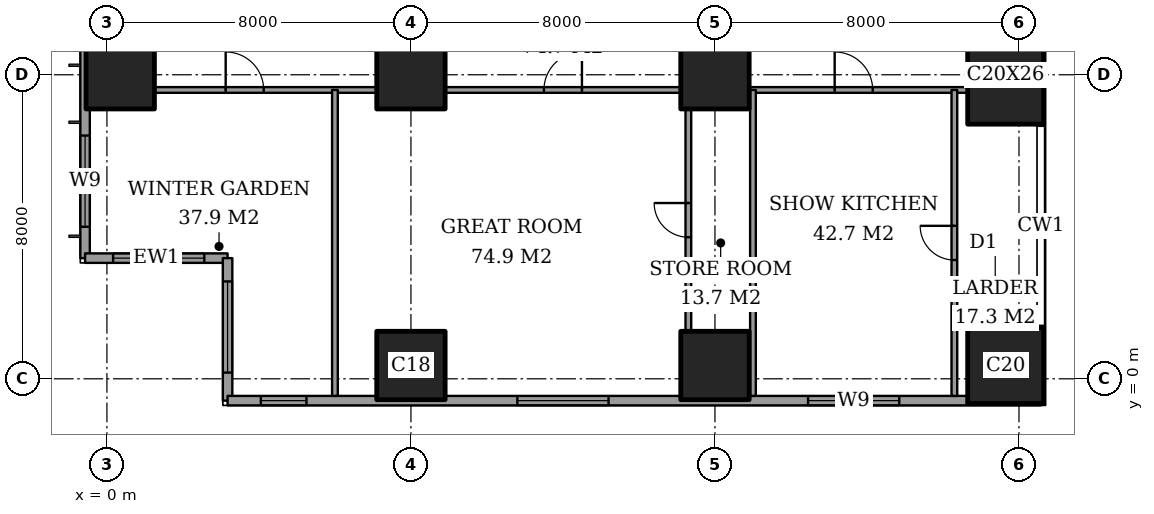
"""IFC4 building model, lengths in metres.
Left out: names, types, materials, properties, quantities, classifications, styles, units other than length and angle.
Written with IfcOpenShell. Run it as: python <this file> out.ifc"""

import sys

from ifc_helpers import new_model, si_unit, direction, frame, frame_2d, origin, origin_2d, place, context, subcontext, project, spatial, rectangle, extrude, element, fill, save


model = new_model("IFC4")
c1 = context("Model", 3, precision=1e-05, world=origin(), true_north=direction((0.0, 1.0)))
c2 = subcontext(c1, "Body", "Model", "MODEL_VIEW")
j1 = project(units=[si_unit("LENGTHUNIT", "METRE"), si_unit("PLANEANGLEUNIT", "RADIAN")], contexts=[c1])
p1 = place(None, origin())
s1 = spatial("IfcSite", under=j1, at=p1, CompositionType="ELEMENT")
p2 = place(p1, origin())
s2 = spatial("IfcBuilding", under=s1, at=p2, CompositionType="ELEMENT")
p3 = place(p2, frame((0.0, 0.0, 196.6)))
s3 = spatial("IfcBuildingStorey", under=s2, at=p3, CompositionType="ELEMENT", Elevation=196.6)
for number, where, z_axis, x_axis in (
    (1, (0.35, 8.0, 0.0), (0.0, 0.0, 1.0), (1.0, 0.0, 0.0)),
    (2, (8.0, 0.35, 0.0), (0.0, 0.0, 1.0), (1.0, 0.0, 0.0)),
    (3, (8.0, 8.0, 0.0), (0.0, 0.0, 1.0), (1.0, 0.0, 0.0)),
    (4, (16.0, 0.35, 0.0), (0.0, 0.0, 1.0), (1.0, 0.0, 0.0)),
    (5, (16.0, 8.0, 0.0), (0.0, 0.0, 1.0), (1.0, 0.0, 0.0)),
):
    element("IfcColumn", number, at=place(p3, frame(where, z_axis=z_axis, x_axis=x_axis)), inside=s3, PredefinedType="COLUMN", context=c2, shape_type="SweptSolid", body=[
        extrude(rectangle(XDim=1.8, YDim=1.8, at=origin_2d()), origin(), (0.0, 0.0, 1.0), 3.6),
    ])
p4 = place(p3, frame((23.65, 0.35, 0.0), z_axis=(0.0, 0.0, 1.0), x_axis=(1.0, 0.0, 0.0)))
e6 = element("IfcColumn", 6, at=p4, inside=s3, PredefinedType="COLUMN", context=c2, shape_type="SweptSolid", body=[
    extrude(rectangle(XDim=2.0, YDim=2.0, at=origin_2d()), origin(), (0.0, 0.0, 1.0), 3.6),
])
p5 = place(p3, frame((23.65, 8.0, 0.0), z_axis=(0.0, 0.0, 1.0), x_axis=(1.0, 0.0, 0.0)))
e7 = element("IfcColumn", 7, at=p5, inside=s3, PredefinedType="COLUMN", context=c2, shape_type="SweptSolid", body=[
    extrude(rectangle(XDim=2.0, YDim=2.6, at=origin_2d()), origin(), (0.0, 0.0, 1.0), 3.6),
])
p6 = place(p3, frame((-0.575, 44.825, 0.0), z_axis=(0.0, 0.0, 1.0), x_axis=(0.0, -1.0, 0.0)))
e8 = element("IfcWall", 8, at=p6, inside=s3, PredefinedType="SOLIDWALL", context=c2, shape_type="SweptSolid", body=[
    extrude(rectangle(XDim=41.65, YDim=0.25, at=frame_2d((20.825, 0.0))), origin(), (0.0, 0.0, 1.0), 3.6),
])
p7 = place(p6, frame((0.825, 0.0, 0.2)))
e9 = element("IfcOpeningElement", 9, at=p7, cuts=e8, PredefinedType="OPENING", context=c2, shape_type="SweptSolid", body=[
    extrude(rectangle(XDim=2.4, YDim=2.4, at=frame_2d((1.2, 1.2))), frame((0.0, 0.135, 0.0), z_axis=(0.0, -1.0, 0.0), x_axis=(1.0, 0.0, 0.0)), (0.0, 0.0, 1.0), 0.27),
])
p8 = place(p6, frame((6.05, 0.0, 0.2)))
e10 = element("IfcOpeningElement", 10, at=p8, cuts=e8, PredefinedType="OPENING", context=c2, shape_type="SweptSolid", body=[
    extrude(rectangle(XDim=1.2, YDim=2.4, at=frame_2d((0.6, 1.2))), frame((0.0, 0.135, 0.0), z_axis=(0.0, -1.0, 0.0), x_axis=(1.0, 0.0, 0.0)), (0.0, 0.0, 1.0), 0.27),
])
p9 = place(p6, frame((8.225, 0.0, 0.2)))
e11 = element("IfcOpeningElement", 11, at=p9, cuts=e8, PredefinedType="OPENING", context=c2, shape_type="SweptSolid", body=[
    extrude(rectangle(XDim=2.4, YDim=2.4, at=frame_2d((1.2, 1.2))), frame((0.0, 0.135, 0.0), z_axis=(0.0, -1.0, 0.0), x_axis=(1.0, 0.0, 0.0)), (0.0, 0.0, 1.0), 0.27),
])
p10 = place(p6, frame((15.625, 0.0, 0.2)))
e12 = element("IfcOpeningElement", 12, at=p10, cuts=e8, PredefinedType="OPENING", context=c2, shape_type="SweptSolid", body=[
    extrude(rectangle(XDim=2.4, YDim=2.4, at=frame_2d((1.2, 1.2))), frame((0.0, 0.135, 0.0), z_axis=(0.0, -1.0, 0.0), x_axis=(1.0, 0.0, 0.0)), (0.0, 0.0, 1.0), 0.27),
])
p11 = place(p6, frame((23.625, 0.0, 0.2)))
e13 = element("IfcOpeningElement", 13, at=p11, cuts=e8, PredefinedType="OPENING", context=c2, shape_type="SweptSolid", body=[
    extrude(rectangle(XDim=2.4, YDim=2.4, at=frame_2d((1.2, 1.2))), frame((0.0, 0.135, 0.0), z_axis=(0.0, -1.0, 0.0), x_axis=(1.0, 0.0, 0.0)), (0.0, 0.0, 1.0), 0.27),
])
p12 = place(p6, frame((30.775, 0.0, 0.2)))
e14 = element("IfcOpeningElement", 14, at=p12, cuts=e8, PredefinedType="OPENING", context=c2, shape_type="SweptSolid", body=[
    extrude(rectangle(XDim=2.4, YDim=2.4, at=frame_2d((1.2, 1.2))), frame((0.0, 0.135, 0.0), z_axis=(0.0, -1.0, 0.0), x_axis=(1.0, 0.0, 0.0)), (0.0, 0.0, 1.0), 0.27),
])
p13 = place(p6, frame((34.55, 0.0, 0.2)))
e15 = element("IfcOpeningElement", 15, at=p13, cuts=e8, PredefinedType="OPENING", context=c2, shape_type="SweptSolid", body=[
    extrude(rectangle(XDim=1.2, YDim=2.4, at=frame_2d((0.6, 1.2))), frame((0.0, 0.135, 0.0), z_axis=(0.0, -1.0, 0.0), x_axis=(1.0, 0.0, 0.0)), (0.0, 0.0, 1.0), 0.27),
])
p14 = place(p6, frame((38.425, 0.0, 0.2)))
e16 = element("IfcOpeningElement", 16, at=p14, cuts=e8, PredefinedType="OPENING", context=c2, shape_type="SweptSolid", body=[
    extrude(rectangle(XDim=2.4, YDim=2.4, at=frame_2d((1.2, 1.2))), frame((0.0, 0.135, 0.0), z_axis=(0.0, -1.0, 0.0), x_axis=(1.0, 0.0, 0.0)), (0.0, 0.0, 1.0), 0.27),
])
p15 = place(p3, frame((-0.575, 3.175, 0.0), z_axis=(0.0, 0.0, 1.0), x_axis=(1.0, 0.0, 0.0)))
e17 = element("IfcWall", 17, at=p15, inside=s3, PredefinedType="SOLIDWALL", context=c2, shape_type="SweptSolid", body=[
    extrude(rectangle(XDim=3.75, YDim=0.25, at=frame_2d((1.875, 0.0))), origin(), (0.0, 0.0, 1.0), 3.6),
])
p16 = place(p15, frame((0.738, 0.0, 0.2)))
e18 = element("IfcOpeningElement", 18, at=p16, cuts=e17, PredefinedType="OPENING", context=c2, shape_type="SweptSolid", body=[
    extrude(rectangle(XDim=2.4, YDim=2.4, at=frame_2d((1.2, 1.2))), frame((0.0, 0.135, 0.0), z_axis=(0.0, -1.0, 0.0), x_axis=(1.0, 0.0, 0.0)), (0.0, 0.0, 1.0), 0.27),
])
p17 = place(p3, frame((3.175, 3.175, 0.0), z_axis=(0.0, 0.0, 1.0), x_axis=(0.0, -1.0, 0.0)))
e19 = element("IfcWall", 19, at=p17, inside=s3, PredefinedType="SOLIDWALL", context=c2, shape_type="SweptSolid", body=[
    extrude(rectangle(XDim=3.75, YDim=0.25, at=frame_2d((1.875, 0.0))), origin(), (0.0, 0.0, 1.0), 3.6),
])
p18 = place(p17, frame((0.613, 0.0, 0.2)))
e20 = element("IfcOpeningElement", 20, at=p18, cuts=e19, PredefinedType="OPENING", context=c2, shape_type="SweptSolid", body=[
    extrude(rectangle(XDim=2.4, YDim=2.4, at=frame_2d((1.2, 1.2))), frame((0.0, 0.135, 0.0), z_axis=(0.0, -1.0, 0.0), x_axis=(1.0, 0.0, 0.0)), (0.0, 0.0, 1.0), 0.27),
])
p19 = place(p3, frame((3.175, -0.575, 0.0), z_axis=(0.0, 0.0, 1.0), x_axis=(1.0, 0.0, 0.0)))
e21 = element("IfcWall", 21, at=p19, inside=s3, PredefinedType="SOLIDWALL", context=c2, shape_type="SweptSolid", body=[
    extrude(rectangle(XDim=21.4, YDim=0.25, at=frame_2d((10.7, 0.0))), origin(), (0.0, 0.0, 1.0), 3.6),
])
p20 = place(p19, frame((0.875, 0.0, 0.2)))
e22 = element("IfcOpeningElement", 22, at=p20, cuts=e21, PredefinedType="OPENING", context=c2, shape_type="SweptSolid", body=[
    extrude(rectangle(XDim=1.2, YDim=2.4, at=frame_2d((0.6, 1.2))), frame((0.0, 0.135, 0.0), z_axis=(0.0, -1.0, 0.0), x_axis=(1.0, 0.0, 0.0)), (0.0, 0.0, 1.0), 0.27),
])
p21 = place(p19, frame((7.625, 0.0, 0.2)))
e23 = element("IfcOpeningElement", 23, at=p21, cuts=e21, PredefinedType="OPENING", context=c2, shape_type="SweptSolid", body=[
    extrude(rectangle(XDim=2.4, YDim=2.4, at=frame_2d((1.2, 1.2))), frame((0.0, 0.135, 0.0), z_axis=(0.0, -1.0, 0.0), x_axis=(1.0, 0.0, 0.0)), (0.0, 0.0, 1.0), 0.27),
])
p22 = place(p19, frame((15.275, 0.0, 0.2)))
e24 = element("IfcOpeningElement", 24, at=p22, cuts=e21, PredefinedType="OPENING", context=c2, shape_type="SweptSolid", body=[
    extrude(rectangle(XDim=2.4, YDim=2.4, at=frame_2d((1.2, 1.2))), frame((0.0, 0.135, 0.0), z_axis=(0.0, -1.0, 0.0), x_axis=(1.0, 0.0, 0.0)), (0.0, 0.0, 1.0), 0.27),
])
p23 = place(p3, frame((1.25, 7.6, 0.0), z_axis=(0.0, 0.0, 1.0), x_axis=(1.0, 0.0, 0.0)))
e25 = element("IfcWall", 25, at=p23, inside=s3, PredefinedType="PARTITIONING", context=c2, shape_type="SweptSolid", body=[
    extrude(rectangle(XDim=5.85, YDim=0.15, at=frame_2d((2.925, 0.0))), origin(), (0.0, 0.0, 1.0), 3.35),
])
p24 = place(p23, frame((1.875, 0.0, 0.0)))
e26 = element("IfcOpeningElement", 26, at=p24, cuts=e25, PredefinedType="OPENING", context=c2, shape_type="SweptSolid", body=[
    extrude(rectangle(XDim=1.0, YDim=2.1, at=frame_2d((0.5, 1.05))), frame((0.0, 0.085, 0.0), z_axis=(0.0, -1.0, 0.0), x_axis=(1.0, 0.0, 0.0)), (0.0, 0.0, 1.0), 0.17),
])
p25 = place(p3, frame((8.9, 7.6, 0.0), z_axis=(0.0, 0.0, 1.0), x_axis=(1.0, 0.0, 0.0)))
e27 = element("IfcWall", 27, at=p25, inside=s3, PredefinedType="PARTITIONING", context=c2, shape_type="SweptSolid", body=[
    extrude(rectangle(XDim=6.2, YDim=0.15, at=frame_2d((3.1, 0.0))), origin(), (0.0, 0.0, 1.0), 3.35),
])
p26 = place(p25, frame((2.6, 0.0, 0.0)))
e28 = element("IfcOpeningElement", 28, at=p26, cuts=e27, PredefinedType="OPENING", context=c2, shape_type="SweptSolid", body=[
    extrude(rectangle(XDim=1.0, YDim=2.1, at=frame_2d((0.5, 1.05))), frame((0.0, 0.085, 0.0), z_axis=(0.0, -1.0, 0.0), x_axis=(1.0, 0.0, 0.0)), (0.0, 0.0, 1.0), 0.17),
])
p27 = place(p3, frame((16.9, 7.6, 0.0), z_axis=(0.0, 0.0, 1.0), x_axis=(1.0, 0.0, 0.0)))
e29 = element("IfcWall", 29, at=p27, inside=s3, PredefinedType="PARTITIONING", context=c2, shape_type="SweptSolid", body=[
    extrude(rectangle(XDim=5.75, YDim=0.15, at=frame_2d((2.875, 0.0))), origin(), (0.0, 0.0, 1.0), 3.35),
])
p28 = place(p27, frame((2.25, 0.0, 0.0)))
e30 = element("IfcOpeningElement", 30, at=p28, cuts=e29, PredefinedType="OPENING", context=c2, shape_type="SweptSolid", body=[
    extrude(rectangle(XDim=1.0, YDim=2.1, at=frame_2d((0.5, 1.05))), frame((0.0, 0.085, 0.0), z_axis=(0.0, -1.0, 0.0), x_axis=(1.0, 0.0, 0.0)), (0.0, 0.0, 1.0), 0.17),
])
p29 = place(p3, frame((6.0, -0.45, 0.0), z_axis=(0.0, 0.0, 1.0), x_axis=(0.0, 1.0, 0.0)))
e31 = element("IfcWall", 31, at=p29, inside=s3, PredefinedType="PARTITIONING", context=c2, shape_type="SweptSolid", body=[
    extrude(rectangle(XDim=8.05, YDim=0.15, at=frame_2d((4.025, 0.0))), origin(), (0.0, 0.0, 1.0), 3.35),
])
p30 = place(p3, frame((15.3, 1.25, 0.0), z_axis=(0.0, 0.0, 1.0), x_axis=(0.0, 1.0, 0.0)))
e32 = element("IfcWall", 32, at=p30, inside=s3, PredefinedType="PARTITIONING", context=c2, shape_type="SweptSolid", body=[
    extrude(rectangle(XDim=5.85, YDim=0.15, at=frame_2d((2.925, 0.0))), origin(), (0.0, 0.0, 1.0), 3.35),
])
p31 = place(p30, frame((2.475, 0.0, 0.0)))
e33 = element("IfcOpeningElement", 33, at=p31, cuts=e32, PredefinedType="OPENING", context=c2, shape_type="SweptSolid", body=[
    extrude(rectangle(XDim=0.9, YDim=2.1, at=frame_2d((0.45, 1.05))), frame((0.0, 0.085, 0.0), z_axis=(0.0, -1.0, 0.0), x_axis=(1.0, 0.0, 0.0)), (0.0, 0.0, 1.0), 0.17),
])
p32 = place(p3, frame((17.0, -0.45, 0.0), z_axis=(0.0, 0.0, 1.0), x_axis=(0.0, 1.0, 0.0)))
e34 = element("IfcWall", 34, at=p32, inside=s3, PredefinedType="PARTITIONING", context=c2, shape_type="SweptSolid", body=[
    extrude(rectangle(XDim=8.05, YDim=0.15, at=frame_2d((4.025, 0.0))), origin(), (0.0, 0.0, 1.0), 3.35),
])
p33 = place(p3, frame((22.3, -0.45, 0.0), z_axis=(0.0, 0.0, 1.0), x_axis=(0.0, 1.0, 0.0)))
e35 = element("IfcWall", 35, at=p33, inside=s3, PredefinedType="PARTITIONING", context=c2, shape_type="SweptSolid", body=[
    extrude(rectangle(XDim=8.05, YDim=0.15, at=frame_2d((4.025, 0.0))), origin(), (0.0, 0.0, 1.0), 3.35),
])
p34 = place(p33, frame((3.575, 0.0, 0.0)))
e36 = element("IfcOpeningElement", 36, at=p34, cuts=e35, PredefinedType="OPENING", context=c2, shape_type="SweptSolid", body=[
    extrude(rectangle(XDim=0.9, YDim=2.1, at=frame_2d((0.45, 1.05))), frame((0.0, 0.085, 0.0), z_axis=(0.0, -1.0, 0.0), x_axis=(1.0, 0.0, 0.0)), (0.0, 0.0, 1.0), 0.17),
])
p35 = place(p14, origin())
e37 = element("IfcWindow", 37, at=p35, inside=s3, PartitioningType="SINGLE_PANEL", PredefinedType="WINDOW", context=c2, shape_type="SweptSolid", body=[
    extrude(rectangle(XDim=2.4, YDim=2.4, at=frame_2d((1.2, 1.2))), frame((0.0, 0.03, 0.0), z_axis=(0.0, -1.0, 0.0), x_axis=(1.0, 0.0, 0.0)), (0.0, 0.0, 1.0), 0.06),
])
fill(e16, e37)
p36 = place(p16, origin())
e38 = element("IfcWindow", 38, at=p36, inside=s3, PartitioningType="SINGLE_PANEL", PredefinedType="WINDOW", context=c2, shape_type="SweptSolid", body=[
    extrude(rectangle(XDim=2.4, YDim=2.4, at=frame_2d((1.2, 1.2))), frame((0.0, 0.03, 0.0), z_axis=(0.0, -1.0, 0.0), x_axis=(1.0, 0.0, 0.0)), (0.0, 0.0, 1.0), 0.06),
])
fill(e18, e38)
p37 = place(p18, origin())
e39 = element("IfcWindow", 39, at=p37, inside=s3, PartitioningType="SINGLE_PANEL", PredefinedType="WINDOW", context=c2, shape_type="SweptSolid", body=[
    extrude(rectangle(XDim=2.4, YDim=2.4, at=frame_2d((1.2, 1.2))), frame((0.0, 0.03, 0.0), z_axis=(0.0, -1.0, 0.0), x_axis=(1.0, 0.0, 0.0)), (0.0, 0.0, 1.0), 0.06),
])
fill(e20, e39)
p38 = place(p20, origin())
e40 = element("IfcWindow", 40, at=p38, inside=s3, PartitioningType="SINGLE_PANEL", PredefinedType="WINDOW", context=c2, shape_type="SweptSolid", body=[
    extrude(rectangle(XDim=1.2, YDim=2.4, at=frame_2d((0.6, 1.2))), frame((0.0, 0.03, 0.0), z_axis=(0.0, -1.0, 0.0), x_axis=(1.0, 0.0, 0.0)), (0.0, 0.0, 1.0), 0.06),
])
fill(e22, e40)
p39 = place(p21, origin())
e41 = element("IfcWindow", 41, at=p39, inside=s3, PartitioningType="SINGLE_PANEL", PredefinedType="WINDOW", context=c2, shape_type="SweptSolid", body=[
    extrude(rectangle(XDim=2.4, YDim=2.4, at=frame_2d((1.2, 1.2))), frame((0.0, 0.03, 0.0), z_axis=(0.0, -1.0, 0.0), x_axis=(1.0, 0.0, 0.0)), (0.0, 0.0, 1.0), 0.06),
])
fill(e23, e41)
p40 = place(p22, origin())
e42 = element("IfcWindow", 42, at=p40, inside=s3, PartitioningType="SINGLE_PANEL", PredefinedType="WINDOW", context=c2, shape_type="SweptSolid", body=[
    extrude(rectangle(XDim=2.4, YDim=2.4, at=frame_2d((1.2, 1.2))), frame((0.0, 0.03, 0.0), z_axis=(0.0, -1.0, 0.0), x_axis=(1.0, 0.0, 0.0)), (0.0, 0.0, 1.0), 0.06),
])
fill(e24, e42)
p41 = place(p24, origin())
e43 = element("IfcDoor", 43, at=p41, inside=s3, OperationType="SINGLE_SWING_RIGHT", PredefinedType="DOOR", context=c2, shape_type="SweptSolid", body=[
    extrude(rectangle(XDim=1.0, YDim=2.1, at=frame_2d((0.5, 1.05))), frame((0.0, 0.025, 0.0), z_axis=(0.0, -1.0, 0.0), x_axis=(1.0, 0.0, 0.0)), (0.0, 0.0, 1.0), 0.05),
])
fill(e26, e43)
p42 = place(p26, origin())
e44 = element("IfcDoor", 44, at=p42, inside=s3, OperationType="SINGLE_SWING_LEFT", PredefinedType="DOOR", context=c2, shape_type="SweptSolid", body=[
    extrude(rectangle(XDim=1.0, YDim=2.1, at=frame_2d((0.5, 1.05))), frame((0.0, 0.025, 0.0), z_axis=(0.0, -1.0, 0.0), x_axis=(1.0, 0.0, 0.0)), (0.0, 0.0, 1.0), 0.05),
])
fill(e28, e44)
p43 = place(p31, origin())
e45 = element("IfcDoor", 45, at=p43, inside=s3, OperationType="SINGLE_SWING_LEFT", PredefinedType="DOOR", context=c2, shape_type="SweptSolid", body=[
    extrude(rectangle(XDim=0.9, YDim=2.1, at=frame_2d((0.45, 1.05))), frame((0.0, 0.025, 0.0), z_axis=(0.0, -1.0, 0.0), x_axis=(1.0, 0.0, 0.0)), (0.0, 0.0, 1.0), 0.05),
])
fill(e33, e45)
p44 = place(p28, origin())
e46 = element("IfcDoor", 46, at=p44, inside=s3, OperationType="SINGLE_SWING_RIGHT", PredefinedType="DOOR", context=c2, shape_type="SweptSolid", body=[
    extrude(rectangle(XDim=1.0, YDim=2.1, at=frame_2d((0.5, 1.05))), frame((0.0, 0.025, 0.0), z_axis=(0.0, -1.0, 0.0), x_axis=(1.0, 0.0, 0.0)), (0.0, 0.0, 1.0), 0.05),
])
fill(e30, e46)
p45 = place(p34, origin())
e47 = element("IfcDoor", 47, at=p45, inside=s3, OperationType="SINGLE_SWING_LEFT", PredefinedType="DOOR", context=c2, shape_type="SweptSolid", body=[
    extrude(rectangle(XDim=0.9, YDim=2.1, at=frame_2d((0.45, 1.05))), frame((0.0, 0.025, 0.0), z_axis=(0.0, -1.0, 0.0), x_axis=(1.0, 0.0, 0.0)), (0.0, 0.0, 1.0), 0.05),
])
fill(e36, e47)
save(model, sys.argv[1])
